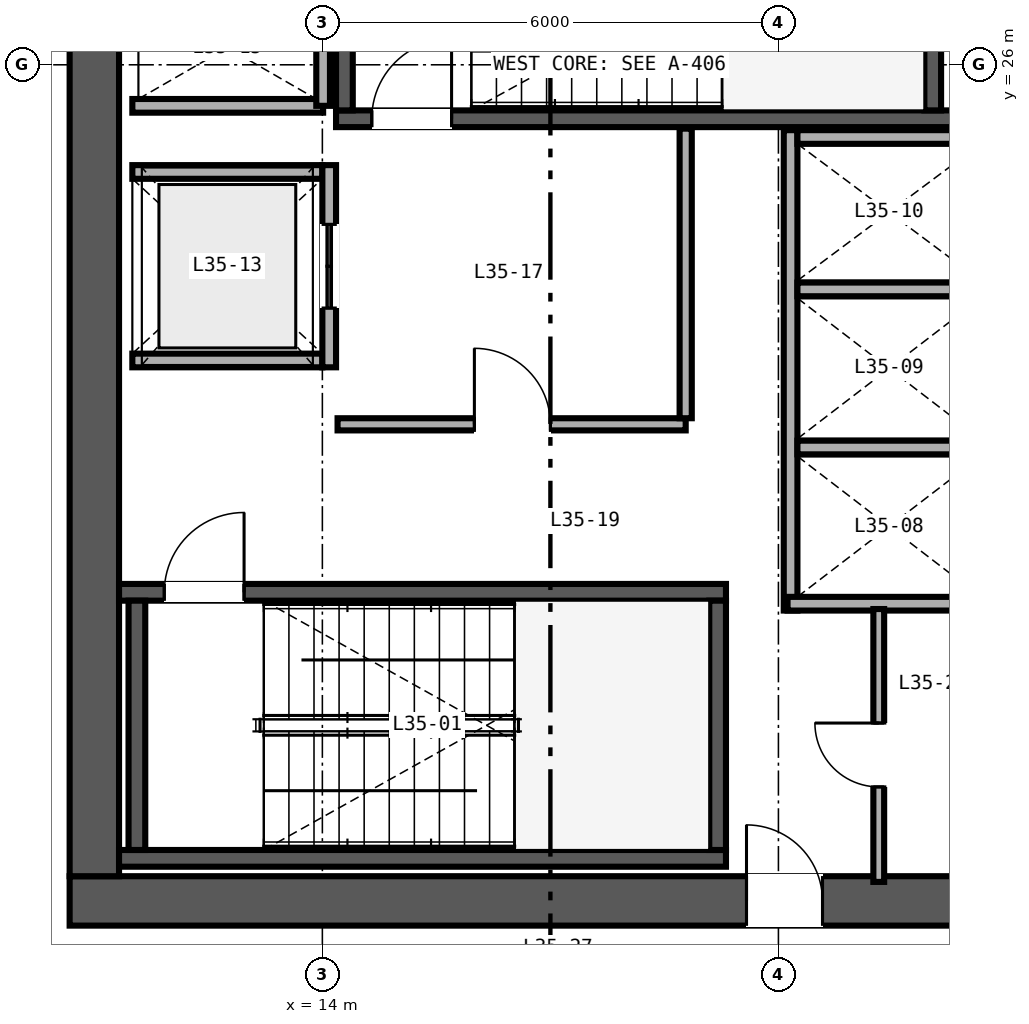
"""IFC4 building model, lengths in metres.
Left out: names, types, materials, properties, quantities, classifications, styles, units other than length and angle.
Written with IfcOpenShell. Run it as: python <this file> out.ifc"""

import sys

from ifc_helpers import new_model, si_unit, direction, frame, frame_2d, origin, place, context, subcontext, project, spatial, rectangle, extrude, source, transform, mapped, element, fill, save


model = new_model("IFC4")
c1 = context("Model", 3, precision=1e-05, world=origin(), true_north=direction((0.0, 1.0)))
c2 = subcontext(c1, "Body", "Model", "MODEL_VIEW")
j1 = project(units=[si_unit("LENGTHUNIT", "METRE"), si_unit("PLANEANGLEUNIT", "RADIAN")], contexts=[c1])
p1 = place(None, origin())
s1 = spatial("IfcSite", under=j1, at=p1, CompositionType="ELEMENT")
p2 = place(p1, origin())
s2 = spatial("IfcBuilding", under=s1, at=p2, CompositionType="ELEMENT")
p3 = place(p2, frame((0.0, 0.0, 140.4)))
s3 = spatial("IfcBuildingStorey", under=s2, at=p3, CompositionType="ELEMENT", Elevation=140.4)
p4 = place(p3, frame((10.675, 15.0, 0.0), z_axis=(0.0, 0.0, 1.0), x_axis=(1.0, 0.0, 0.0)))
e1 = element("IfcWall", 1, at=p4, inside=s3, PredefinedType="SHEAR", context=c2, shape_type="SweptSolid", body=[
    extrude(rectangle(XDim=12.65, YDim=0.65, at=frame_2d((6.325, 0.0))), origin(), (0.0, 0.0, 1.0), 3.36),
])
p5 = place(p4, frame((8.905, 0.0, 0.0)))
e2 = element("IfcOpeningElement", 2, at=p5, cuts=e1, PredefinedType="OPENING", context=c2, shape_type="SweptSolid", body=[
    extrude(rectangle(XDim=1.0, YDim=2.15, at=frame_2d((0.5, 1.075))), frame((0.0, 0.335, 0.0), z_axis=(0.0, -1.0, 0.0), x_axis=(1.0, 0.0, 0.0)), (0.0, 0.0, 1.0), 0.67),
])
p6 = place(p3, frame((11.0, 15.325, 0.0), z_axis=(0.0, 0.0, 1.0), x_axis=(0.0, 1.0, 0.0)))
e3 = element("IfcWall", 3, at=p6, inside=s3, PredefinedType="SHEAR", context=c2, shape_type="SweptSolid", body=[
    extrude(rectangle(XDim=21.35, YDim=0.65, at=frame_2d((10.675, 0.0))), origin(), (0.0, 0.0, 1.0), 3.36),
])
p7 = place(p3, frame((11.325, 15.56, 0.0), z_axis=(0.0, 0.0, 1.0), x_axis=(1.0, 0.0, 0.0)))
e4 = element("IfcWall", 4, at=p7, inside=s3, PredefinedType="SHEAR", context=c2, shape_type="SweptSolid", body=[
    extrude(rectangle(XDim=7.985, YDim=0.22, at=frame_2d((3.993, 0.0))), origin(), (0.0, 0.0, 1.0), 3.4),
])
p8 = place(p3, frame((11.325, 19.06, 0.0), z_axis=(0.0, 0.0, 1.0), x_axis=(1.0, 0.0, 0.0)))
e5 = element("IfcWall", 5, at=p8, inside=s3, PredefinedType="SHEAR", context=c2, shape_type="SweptSolid", body=[
    extrude(rectangle(XDim=7.985, YDim=0.22, at=frame_2d((3.993, 0.0))), origin(), (0.0, 0.0, 1.0), 3.4),
])
p9 = place(p8, frame((0.595, 0.0, 0.0)))
e6 = element("IfcOpeningElement", 6, at=p9, cuts=e5, PredefinedType="OPENING", context=c2, shape_type="SweptSolid", body=[
    extrude(rectangle(XDim=1.05, YDim=2.15, at=frame_2d((0.525, 1.075))), frame((0.0, 0.12, 0.0), z_axis=(0.0, -1.0, 0.0), x_axis=(1.0, 0.0, 0.0)), (0.0, 0.0, 1.0), 0.24),
])
for number, where, z_axis, x_axis in (
    (7, (11.56, 15.67, 0.0), (0.0, 0.0, 1.0), (0.0, 1.0, 0.0)),
    (8, (19.2, 15.67, 0.0), (0.0, 0.0, 1.0), (0.0, 1.0, 0.0)),
):
    element("IfcWall", number, at=place(p3, frame(where, z_axis=z_axis, x_axis=x_axis)), inside=s3, PredefinedType="SHEAR", context=c2, shape_type="SweptSolid", body=[
        extrude(rectangle(XDim=3.28, YDim=0.22, at=frame_2d((1.64, 0.0))), origin(), (0.0, 0.0, 1.0), 3.4),
    ])
p10 = place(p3, frame((14.18, 25.29, 0.0), z_axis=(0.0, 0.0, 1.0), x_axis=(1.0, 0.0, 0.0)))
e9 = element("IfcWall", 9, at=p10, inside=s3, PredefinedType="SHEAR", context=c2, shape_type="SweptSolid", body=[
    extrude(rectangle(XDim=8.495, YDim=0.22, at=frame_2d((4.248, 0.0))), origin(), (0.0, 0.0, 1.0), 3.4),
])
p11 = place(p10, frame((0.47, 0.0, 0.0)))
e10 = element("IfcOpeningElement", 10, at=p11, cuts=e9, PredefinedType="OPENING", context=c2, shape_type="SweptSolid", body=[
    extrude(rectangle(XDim=1.05, YDim=2.15, at=frame_2d((0.525, 1.075))), frame((0.0, 0.12, 0.0), z_axis=(0.0, -1.0, 0.0), x_axis=(1.0, 0.0, 0.0)), (0.0, 0.0, 1.0), 0.24),
])
for number, where, z_axis, x_axis in (
    (11, (14.29, 25.4, 0.0), (0.0, 0.0, 1.0), (0.0, 1.0, 0.0)),
    (12, (22.03, 25.4, 0.0), (0.0, 0.0, 1.0), (0.0, 1.0, 0.0)),
):
    element("IfcWall", number, at=place(p3, frame(where, z_axis=z_axis, x_axis=x_axis)), inside=s3, PredefinedType="SHEAR", context=c2, shape_type="SweptSolid", body=[
        extrude(rectangle(XDim=3.28, YDim=0.22, at=frame_2d((1.64, 0.0))), origin(), (0.0, 0.0, 1.0), 3.4),
    ])
p12 = place(p3, frame((20.16, 18.82, 0.0), z_axis=(0.0, 0.0, 1.0), x_axis=(0.0, 1.0, 0.0)))
e13 = element("IfcWall", 13, at=p12, inside=s3, PredefinedType="SOLIDWALL", context=c2, shape_type="SweptSolid", body=[
    extrude(rectangle(XDim=6.32, YDim=0.18, at=frame_2d((3.16, 0.0))), origin(), (0.0, 0.0, 1.0), 2.36),
])
p13 = place(p3, frame((20.12, 18.91, 0.0), z_axis=(0.0, 0.0, 1.0), x_axis=(1.0, 0.0, 0.0)))
e14 = element("IfcWall", 14, at=p13, inside=s3, PredefinedType="SOLIDWALL", context=c2, shape_type="SweptSolid", body=[
    extrude(rectangle(XDim=2.63, YDim=0.18, at=frame_2d((1.315, 0.0))), origin(), (0.0, 0.0, 1.0), 3.36),
])
p14 = place(p3, frame((20.25, 25.05, 0.0), z_axis=(0.0, 0.0, 1.0), x_axis=(1.0, 0.0, 0.0)))
e15 = element("IfcWall", 15, at=p14, inside=s3, PredefinedType="SOLIDWALL", context=c2, shape_type="SweptSolid", body=[
    extrude(rectangle(XDim=2.36, YDim=0.18, at=frame_2d((1.18, 0.0))), origin(), (0.0, 0.0, 1.0), 3.36),
])
p15 = place(p3, frame((20.25, 20.965, 0.0), z_axis=(0.0, 0.0, 1.0), x_axis=(1.0, 0.0, 0.0)))
e16 = element("IfcWall", 16, at=p15, inside=s3, PredefinedType="SOLIDWALL", context=c2, shape_type="SweptSolid", body=[
    extrude(rectangle(XDim=2.36, YDim=0.18, at=frame_2d((1.18, 0.0))), origin(), (0.0, 0.0, 1.0), 2.36),
])
p16 = place(p3, frame((20.25, 23.045, 0.0), z_axis=(0.0, 0.0, 1.0), x_axis=(1.0, 0.0, 0.0)))
e17 = element("IfcWall", 17, at=p16, inside=s3, PredefinedType="SOLIDWALL", context=c2, shape_type="SweptSolid", body=[
    extrude(rectangle(XDim=2.36, YDim=0.18, at=frame_2d((1.18, 0.0))), origin(), (0.0, 0.0, 1.0), 3.36),
])
for number, where, z_axis, x_axis in (
    (18, (11.5, 22.11, 0.0), (0.0, 0.0, 1.0), (1.0, 0.0, 0.0)),
    (19, (11.5, 24.59, 0.0), (0.0, 0.0, 1.0), (1.0, 0.0, 0.0)),
):
    element("IfcWall", number, at=place(p3, frame(where, z_axis=z_axis, x_axis=x_axis)), inside=s3, PredefinedType="SOLIDWALL", context=c2, shape_type="SweptSolid", body=[
        extrude(rectangle(XDim=2.5, YDim=0.18, at=frame_2d((1.25, 0.0))), origin(), (0.0, 0.0, 1.0), 3.36),
    ])
p17 = place(p3, frame((14.09, 22.02, 0.0), z_axis=(0.0, 0.0, 1.0), x_axis=(0.0, 1.0, 0.0)))
e20 = element("IfcWall", 20, at=p17, inside=s3, PredefinedType="SOLIDWALL", context=c2, shape_type="SweptSolid", body=[
    extrude(rectangle(XDim=2.66, YDim=0.18, at=frame_2d((1.33, 0.0))), origin(), (0.0, 0.0, 1.0), 3.36),
])
p18 = place(p17, frame((0.78, 0.0, 0.0)))
e21 = element("IfcOpeningElement", 21, at=p18, cuts=e20, PredefinedType="OPENING", context=c2, shape_type="SweptSolid", body=[
    extrude(rectangle(XDim=1.1, YDim=2.2, at=frame_2d((0.55, 1.1))), frame((0.0, 0.1, 0.0), z_axis=(0.0, -1.0, 0.0), x_axis=(1.0, 0.0, 0.0)), (0.0, 0.0, 1.0), 0.2),
])
p19 = place(p3, frame((11.5, 25.46, 0.0), z_axis=(0.0, 0.0, 1.0), x_axis=(1.0, 0.0, 0.0)))
e22 = element("IfcWall", 22, at=p19, inside=s3, PredefinedType="SOLIDWALL", context=c2, shape_type="SweptSolid", body=[
    extrude(rectangle(XDim=2.51, YDim=0.18, at=frame_2d((1.255, 0.0))), origin(), (0.0, 0.0, 1.0), 3.36),
])
p20 = place(p3, frame((14.01, 25.46, 0.0), z_axis=(0.0, 0.0, 1.0), x_axis=(0.0, 1.0, 0.0)))
e23 = element("IfcWall", 23, at=p20, inside=s3, PredefinedType="SOLIDWALL", context=c2, shape_type="SweptSolid", body=[
    extrude(rectangle(XDim=3.08, YDim=0.18, at=frame_2d((1.54, 0.0))), origin(), (0.0, 0.0, 1.0), 3.36),
])
p21 = place(p3, frame((14.2, 21.27, 0.0), z_axis=(0.0, 0.0, 1.0), x_axis=(1.0, 0.0, 0.0)))
e24 = element("IfcWall", 24, at=p21, inside=s3, PredefinedType="PARTITIONING", context=c2, shape_type="SweptSolid", body=[
    extrude(rectangle(XDim=4.58, YDim=0.16, at=frame_2d((2.29, 0.0))), origin(), (0.0, 0.0, 1.0), 3.36),
])
p22 = place(p21, frame((1.8, 0.0, 0.0)))
e25 = element("IfcOpeningElement", 25, at=p22, cuts=e24, PredefinedType="OPENING", context=c2, shape_type="SweptSolid", body=[
    extrude(rectangle(XDim=1.0, YDim=2.15, at=frame_2d((0.5, 1.075))), frame((0.0, 0.09, 0.0), z_axis=(0.0, -1.0, 0.0), x_axis=(1.0, 0.0, 0.0)), (0.0, 0.0, 1.0), 0.18),
])
p23 = place(p3, frame((18.78, 21.35, 0.0), z_axis=(0.0, 0.0, 1.0), x_axis=(0.0, 1.0, 0.0)))
e26 = element("IfcWall", 26, at=p23, inside=s3, PredefinedType="PARTITIONING", context=c2, shape_type="SweptSolid", body=[
    extrude(rectangle(XDim=3.81, YDim=0.16, at=frame_2d((1.905, 0.0))), origin(), (0.0, 0.0, 1.0), 3.36),
])
p24 = place(p3, frame((21.32, 15.25, 0.0), z_axis=(0.0, 0.0, 1.0), x_axis=(0.0, 1.0, 0.0)))
e27 = element("IfcWall", 27, at=p24, inside=s3, PredefinedType="PARTITIONING", context=c2, shape_type="SweptSolid", body=[
    extrude(rectangle(XDim=3.59, YDim=0.142, at=frame_2d((1.795, 0.0))), origin(), (0.0, 0.0, 1.0), 3.36),
])
p25 = place(p24, frame((1.25, 0.0, 0.0)))
e28 = element("IfcOpeningElement", 28, at=p25, cuts=e27, PredefinedType="OPENING", context=c2, shape_type="SweptSolid", body=[
    extrude(rectangle(XDim=0.84, YDim=2.1, at=frame_2d((0.42, 1.05))), frame((0.0, 0.081, 0.0), z_axis=(0.0, -1.0, 0.0), x_axis=(1.0, 0.0, 0.0)), (0.0, 0.0, 1.0), 0.162),
])
m1 = source(origin(), c2, "Body", "SweptSolid", [
    extrude(rectangle(XDim=1.05, YDim=2.15, at=frame_2d((0.525, 1.075))), frame((0.0, 0.025, 0.0), z_axis=(0.0, -1.0, 0.0), x_axis=(1.0, 0.0, 0.0)), (0.0, 0.0, 1.0), 0.05),
])
p26 = place(p9, origin())
e29 = element("IfcDoor", 29, at=p26, inside=s3, OperationType="SINGLE_SWING_RIGHT", PredefinedType="DOOR", context=c2, shape_type="MappedRepresentation", body=[
    mapped(m1, transform((0.0, 0.0, 0.0), scale=1.0)),
])
fill(e6, e29)
p27 = place(p11, origin())
e30 = element("IfcDoor", 30, at=p27, inside=s3, OperationType="SINGLE_SWING_RIGHT", PredefinedType="DOOR", context=c2, shape_type="MappedRepresentation", body=[
    mapped(m1, transform((0.0, 0.0, 0.0), scale=1.0)),
])
fill(e10, e30)
m2 = source(origin(), c2, "Body", "SweptSolid", [
    extrude(rectangle(XDim=1.1, YDim=2.2, at=frame_2d((0.55, 1.1))), frame((0.0, 0.025, 0.0), z_axis=(0.0, -1.0, 0.0), x_axis=(1.0, 0.0, 0.0)), (0.0, 0.0, 1.0), 0.05),
])
p28 = place(p18, origin())
e31 = element("IfcDoor", 31, at=p28, inside=s3, OperationType="DOUBLE_DOOR_SLIDING", PredefinedType="DOOR", context=c2, shape_type="MappedRepresentation", body=[
    mapped(m2, transform((0.0, 0.0, 0.0), scale=1.0)),
])
fill(e21, e31)
m3 = source(origin(), c2, "Body", "SweptSolid", [
    extrude(rectangle(XDim=1.0, YDim=2.15, at=frame_2d((0.5, 1.075))), frame((0.0, 0.025, 0.0), z_axis=(0.0, -1.0, 0.0), x_axis=(1.0, 0.0, 0.0)), (0.0, 0.0, 1.0), 0.05),
])
p29 = place(p22, origin())
e32 = element("IfcDoor", 32, at=p29, inside=s3, OperationType="SINGLE_SWING_LEFT", PredefinedType="DOOR", context=c2, shape_type="MappedRepresentation", body=[
    mapped(m3, transform((0.0, 0.0, 0.0), scale=1.0)),
])
fill(e25, e32)
m4 = source(origin(), c2, "Body", "SweptSolid", [
    extrude(rectangle(XDim=0.84, YDim=2.1, at=frame_2d((0.42, 1.05))), frame((0.0, 0.025, 0.0), z_axis=(0.0, -1.0, 0.0), x_axis=(1.0, 0.0, 0.0)), (0.0, 0.0, 1.0), 0.05),
])
p30 = place(p25, origin())
e33 = element("IfcDoor", 33, at=p30, inside=s3, OperationType="SINGLE_SWING_RIGHT", PredefinedType="DOOR", context=c2, shape_type="MappedRepresentation", body=[
    mapped(m4, transform((0.0, 0.0, 0.0), scale=1.0)),
])
fill(e28, e33)
p31 = place(p5, origin())
e34 = element("IfcDoor", 34, at=p31, inside=s3, OperationType="SINGLE_SWING_LEFT", PredefinedType="DOOR", context=c2, shape_type="MappedRepresentation", body=[
    mapped(m3, transform((0.0, 0.0, 0.0), scale=1.0)),
])
fill(e2, e34)
save(model, sys.argv[1])
